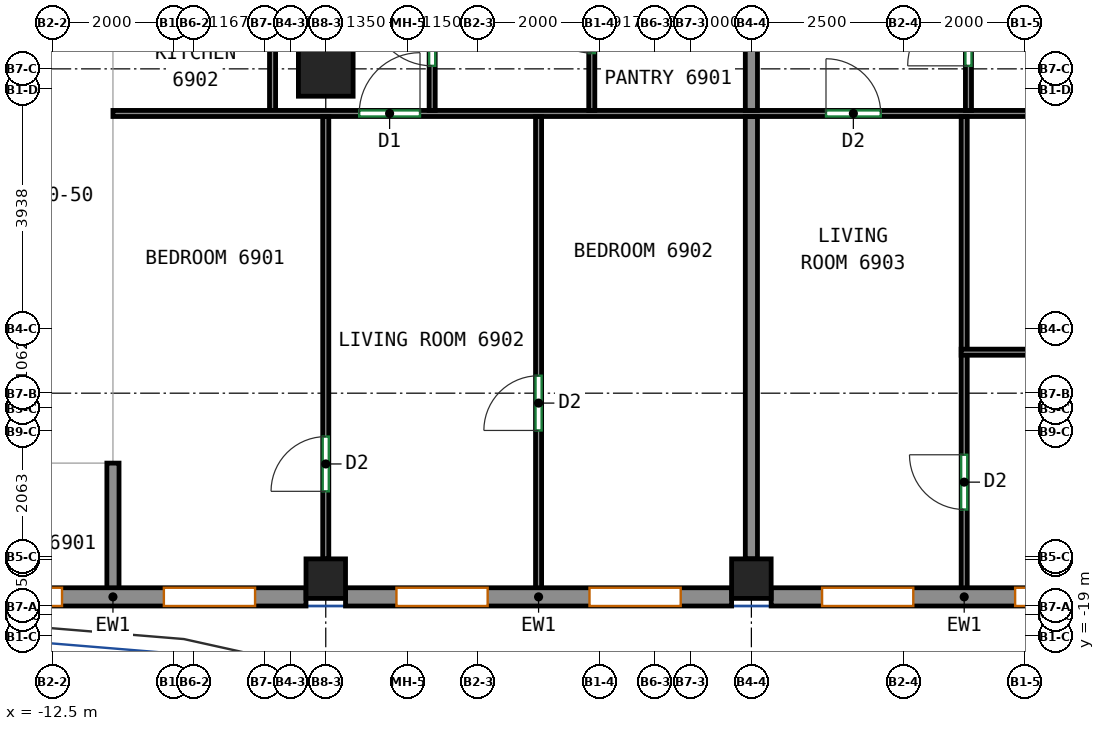
"""IFC4 building model, lengths in metres.
Left out: names, types, materials, properties, quantities, classifications, styles, units other than length and angle.
Written with IfcOpenShell. Run it as: python <this file> out.ifc"""

import sys

from ifc_helpers import new_model, si_unit, direction, frame, frame_2d, origin, origin_2d, place, context, subcontext, project, spatial, rectangle, extrude, source, transform, mapped, element, fill, save


model = new_model("IFC4")
c1 = context("Model", 3, precision=1e-05, world=origin(), true_north=direction((0.0, 1.0)))
c2 = subcontext(c1, "Body", "Model", "MODEL_VIEW")
j1 = project(units=[si_unit("LENGTHUNIT", "METRE"), si_unit("PLANEANGLEUNIT", "RADIAN")], contexts=[c1])
p1 = place(None, origin())
s1 = spatial("IfcSite", under=j1, at=p1, CompositionType="ELEMENT")
p2 = place(p1, origin())
s2 = spatial("IfcBuilding", under=s1, at=p2, CompositionType="ELEMENT")
p3 = place(p2, frame((0.0, 0.0, 280.6)))
s3 = spatial("IfcBuildingStorey", under=s2, at=p3, CompositionType="ELEMENT", Elevation=280.6)
m1 = source(origin(), c2, "Body", "SweptSolid", [
    extrude(rectangle(XDim=0.65, YDim=0.65, at=origin_2d()), origin(), (0.0, 0.0, 1.0), 3.12),
])
p4 = place(p3, frame((-8.0, -18.05, 0.0), z_axis=(0.0, 0.0, 1.0), x_axis=(1.0, 0.0, 0.0)))
e1 = element("IfcColumn", 1, at=p4, inside=s3, PredefinedType="COLUMN", context=c2, shape_type="MappedRepresentation", body=[
    mapped(m1, transform((0.0, 0.0, 0.0))),
])
m2 = source(origin(), c2, "Body", "SweptSolid", [
    extrude(rectangle(XDim=0.9, YDim=0.9, at=origin_2d()), origin(), (0.0, 0.0, 1.0), 3.12),
])
p5 = place(p3, frame((-8.0, -9.667, 0.0), z_axis=(0.0, 0.0, 1.0), x_axis=(1.0, 0.0, 0.0)))
e2 = element("IfcColumn", 2, at=p5, inside=s3, PredefinedType="COLUMN", context=c2, shape_type="MappedRepresentation", body=[
    mapped(m2, transform((0.0, 0.0, 0.0))),
])
p6 = place(p3, frame((-1.0, -18.05, 0.0), z_axis=(0.0, 0.0, 1.0), x_axis=(1.0, 0.0, 0.0)))
e3 = element("IfcColumn", 3, at=p6, inside=s3, PredefinedType="COLUMN", context=c2, shape_type="MappedRepresentation", body=[
    mapped(m1, transform((0.0, 0.0, 0.0))),
])
m3 = source(origin(), c2, "Body", "SweptSolid", [
    extrude(rectangle(XDim=6.35, YDim=0.3, at=frame_2d((3.175, 0.0))), origin(), (0.0, 0.0, 1.0), 3.12),
])
p7 = place(p3, frame((-14.675, -18.35, 0.0), z_axis=(0.0, 0.0, 1.0), x_axis=(1.0, 0.0, 0.0)))
e4 = element("IfcWall", 4, at=p7, inside=s3, PredefinedType="SOLIDWALL", context=c2, shape_type="MappedRepresentation", body=[
    mapped(m3, transform((0.0, 0.0, 0.0))),
])
p8 = place(p7, frame((0.837, 0.0, 0.8)))
e5 = element("IfcOpeningElement", 5, at=p8, cuts=e4, PredefinedType="OPENING", context=c2, shape_type="SweptSolid", body=[
    extrude(rectangle(XDim=1.5, YDim=2.05, at=frame_2d((0.75, 1.025))), frame((0.0, 0.16, 0.0), z_axis=(0.0, -1.0, 0.0), x_axis=(1.0, 0.0, 0.0)), (0.0, 0.0, 1.0), 0.32),
])
p9 = place(p7, frame((4.012, 0.0, 0.8)))
e6 = element("IfcOpeningElement", 6, at=p9, cuts=e4, PredefinedType="OPENING", context=c2, shape_type="SweptSolid", body=[
    extrude(rectangle(XDim=1.5, YDim=2.05, at=frame_2d((0.75, 1.025))), frame((0.0, 0.16, 0.0), z_axis=(0.0, -1.0, 0.0), x_axis=(1.0, 0.0, 0.0)), (0.0, 0.0, 1.0), 0.32),
])
p10 = place(p3, frame((-7.675, -18.35, 0.0), z_axis=(0.0, 0.0, 1.0), x_axis=(1.0, 0.0, 0.0)))
e7 = element("IfcWall", 7, at=p10, inside=s3, PredefinedType="SOLIDWALL", context=c2, shape_type="MappedRepresentation", body=[
    mapped(m3, transform((0.0, 0.0, 0.0))),
])
p11 = place(p10, frame((0.837, 0.0, 0.8)))
e8 = element("IfcOpeningElement", 8, at=p11, cuts=e7, PredefinedType="OPENING", context=c2, shape_type="SweptSolid", body=[
    extrude(rectangle(XDim=1.5, YDim=2.05, at=frame_2d((0.75, 1.025))), frame((0.0, 0.16, 0.0), z_axis=(0.0, -1.0, 0.0), x_axis=(1.0, 0.0, 0.0)), (0.0, 0.0, 1.0), 0.32),
])
p12 = place(p10, frame((4.012, 0.0, 0.8)))
e9 = element("IfcOpeningElement", 9, at=p12, cuts=e7, PredefinedType="OPENING", context=c2, shape_type="SweptSolid", body=[
    extrude(rectangle(XDim=1.5, YDim=2.05, at=frame_2d((0.75, 1.025))), frame((0.0, 0.16, 0.0), z_axis=(0.0, -1.0, 0.0), x_axis=(1.0, 0.0, 0.0)), (0.0, 0.0, 1.0), 0.32),
])
p13 = place(p3, frame((-0.675, -18.35, 0.0), z_axis=(0.0, 0.0, 1.0), x_axis=(1.0, 0.0, 0.0)))
e10 = element("IfcWall", 10, at=p13, inside=s3, PredefinedType="SOLIDWALL", context=c2, shape_type="MappedRepresentation", body=[
    mapped(m3, transform((0.0, 0.0, 0.0))),
])
p14 = place(p13, frame((0.837, 0.0, 0.8)))
e11 = element("IfcOpeningElement", 11, at=p14, cuts=e10, PredefinedType="OPENING", context=c2, shape_type="SweptSolid", body=[
    extrude(rectangle(XDim=1.5, YDim=2.05, at=frame_2d((0.75, 1.025))), frame((0.0, 0.16, 0.0), z_axis=(0.0, -1.0, 0.0), x_axis=(1.0, 0.0, 0.0)), (0.0, 0.0, 1.0), 0.32),
])
p15 = place(p13, frame((4.012, 0.0, 0.8)))
e12 = element("IfcOpeningElement", 12, at=p15, cuts=e10, PredefinedType="OPENING", context=c2, shape_type="SweptSolid", body=[
    extrude(rectangle(XDim=1.5, YDim=2.05, at=frame_2d((0.75, 1.025))), frame((0.0, 0.16, 0.0), z_axis=(0.0, -1.0, 0.0), x_axis=(1.0, 0.0, 0.0)), (0.0, 0.0, 1.0), 0.32),
])
p16 = place(p3, frame((-11.5, -18.25, 0.0), z_axis=(0.0, 0.0, 1.0), x_axis=(0.0, 1.0, 0.0)))
e13 = element("IfcWall", 13, at=p16, inside=s3, PredefinedType="PARTITIONING", context=c2, shape_type="SweptSolid", body=[
    extrude(rectangle(XDim=2.1, YDim=0.2, at=frame_2d((1.05, 0.0))), origin(), (0.0, 0.0, 1.0), 3.12),
])
p17 = place(p3, frame((-8.875, -10.35, 0.0), z_axis=(0.0, 0.0, 1.0), x_axis=(0.0, 1.0, 0.0)))
e14 = element("IfcWall", 14, at=p17, inside=s3, PredefinedType="PARTITIONING", context=c2, shape_type="SweptSolid", body=[
    extrude(rectangle(XDim=2.573, YDim=0.1, at=frame_2d((1.287, 0.0))), origin(), (0.0, 0.0, 1.0), 3.12),
])
p18 = place(p17, frame((1.266, 0.0, 0.0)))
e15 = element("IfcOpeningElement", 15, at=p18, cuts=e14, PredefinedType="OPENING", context=c2, shape_type="SweptSolid", body=[
    extrude(rectangle(XDim=1.0, YDim=2.1, at=frame_2d((0.5, 1.05))), frame((0.0, 0.06, 0.0), z_axis=(0.0, -1.0, 0.0), x_axis=(1.0, 0.0, 0.0)), (0.0, 0.0, 1.0), 0.12),
])
p19 = place(p3, frame((-11.5, -10.4, 0.0), z_axis=(0.0, 0.0, 1.0), x_axis=(1.0, 0.0, 0.0)))
e16 = element("IfcWall", 16, at=p19, inside=s3, PredefinedType="PARTITIONING", context=c2, shape_type="SweptSolid", body=[
    extrude(rectangle(XDim=21.1, YDim=0.1, at=frame_2d((10.55, 0.0))), origin(), (0.0, 0.0, 1.0), 3.12),
])
p20 = place(p19, frame((4.05, 0.0, 0.0)))
e17 = element("IfcOpeningElement", 17, at=p20, cuts=e16, PredefinedType="OPENING", context=c2, shape_type="SweptSolid", body=[
    extrude(rectangle(XDim=1.0, YDim=2.1, at=frame_2d((0.5, 1.05))), frame((0.0, 0.06, 0.0), z_axis=(0.0, -1.0, 0.0), x_axis=(1.0, 0.0, 0.0)), (0.0, 0.0, 1.0), 0.12),
])
p21 = place(p19, frame((11.727, 0.0, 0.0)))
e18 = element("IfcOpeningElement", 18, at=p21, cuts=e16, PredefinedType="OPENING", context=c2, shape_type="SweptSolid", body=[
    extrude(rectangle(XDim=0.9, YDim=2.1, at=frame_2d((0.45, 1.05))), frame((0.0, 0.06, 0.0), z_axis=(0.0, -1.0, 0.0), x_axis=(1.0, 0.0, 0.0)), (0.0, 0.0, 1.0), 0.12),
])
p22 = place(p19, frame((15.225, 0.0, 0.0)))
e19 = element("IfcOpeningElement", 19, at=p22, cuts=e16, PredefinedType="OPENING", context=c2, shape_type="SweptSolid", body=[
    extrude(rectangle(XDim=1.0, YDim=2.1, at=frame_2d((0.5, 1.05))), frame((0.0, 0.06, 0.0), z_axis=(0.0, -1.0, 0.0), x_axis=(1.0, 0.0, 0.0)), (0.0, 0.0, 1.0), 0.12),
])
p23 = place(p3, frame((-6.25, -10.35, 0.0), z_axis=(0.0, 0.0, 1.0), x_axis=(0.0, 1.0, 0.0)))
e20 = element("IfcWall", 20, at=p23, inside=s3, PredefinedType="PARTITIONING", context=c2, shape_type="SweptSolid", body=[
    extrude(rectangle(XDim=2.573, YDim=0.1, at=frame_2d((1.287, 0.0))), origin(), (0.0, 0.0, 1.0), 3.12),
])
p24 = place(p23, frame((0.733, 0.0, 0.0)))
e21 = element("IfcOpeningElement", 21, at=p24, cuts=e20, PredefinedType="OPENING", context=c2, shape_type="SweptSolid", body=[
    extrude(rectangle(XDim=1.0, YDim=2.1, at=frame_2d((0.5, 1.05))), frame((0.0, 0.06, 0.0), z_axis=(0.0, -1.0, 0.0), x_axis=(1.0, 0.0, 0.0)), (0.0, 0.0, 1.0), 0.12),
])
p25 = place(p3, frame((-3.625, -10.35, 0.0), z_axis=(0.0, 0.0, 1.0), x_axis=(0.0, 1.0, 0.0)))
e22 = element("IfcWall", 22, at=p25, inside=s3, PredefinedType="PARTITIONING", context=c2, shape_type="SweptSolid", body=[
    extrude(rectangle(XDim=2.573, YDim=0.1, at=frame_2d((1.287, 0.0))), origin(), (0.0, 0.0, 1.0), 3.12),
])
p26 = place(p25, frame((0.943, 0.0, 0.0)))
e23 = element("IfcOpeningElement", 23, at=p26, cuts=e22, PredefinedType="OPENING", context=c2, shape_type="SweptSolid", body=[
    extrude(rectangle(XDim=0.9, YDim=2.1, at=frame_2d((0.45, 1.05))), frame((0.0, 0.06, 0.0), z_axis=(0.0, -1.0, 0.0), x_axis=(1.0, 0.0, 0.0)), (0.0, 0.0, 1.0), 0.12),
])
p27 = place(p3, frame((-1.0, -10.35, 0.0), z_axis=(0.0, 0.0, 1.0), x_axis=(0.0, 1.0, 0.0)))
e24 = element("IfcWall", 24, at=p27, inside=s3, PredefinedType="PARTITIONING", context=c2, shape_type="SweptSolid", body=[
    extrude(rectangle(XDim=2.573, YDim=0.2, at=frame_2d((1.287, 0.0))), origin(), (0.0, 0.0, 1.0), 3.12),
])
p28 = place(p3, frame((-8.0, -17.725, 0.0), z_axis=(0.0, 0.0, 1.0), x_axis=(0.0, 1.0, 0.0)))
e25 = element("IfcWall", 25, at=p28, inside=s3, PredefinedType="PARTITIONING", context=c2, shape_type="SweptSolid", body=[
    extrude(rectangle(XDim=7.273, YDim=0.1, at=frame_2d((3.637, 0.0))), origin(), (0.0, 0.0, 1.0), 3.12),
])
p29 = place(p28, frame((1.111, 0.0, 0.0)))
e26 = element("IfcOpeningElement", 26, at=p29, cuts=e25, PredefinedType="OPENING", context=c2, shape_type="SweptSolid", body=[
    extrude(rectangle(XDim=0.9, YDim=2.1, at=frame_2d((0.45, 1.05))), frame((0.0, 0.06, 0.0), z_axis=(0.0, -1.0, 0.0), x_axis=(1.0, 0.0, 0.0)), (0.0, 0.0, 1.0), 0.12),
])
p30 = place(p3, frame((-4.5, -18.25, 0.0), z_axis=(0.0, 0.0, 1.0), x_axis=(0.0, 1.0, 0.0)))
e27 = element("IfcWall", 27, at=p30, inside=s3, PredefinedType="PARTITIONING", context=c2, shape_type="SweptSolid", body=[
    extrude(rectangle(XDim=7.798, YDim=0.1, at=frame_2d((3.899, 0.0))), origin(), (0.0, 0.0, 1.0), 3.12),
])
p31 = place(p30, frame((2.637, 0.0, 0.0)))
e28 = element("IfcOpeningElement", 28, at=p31, cuts=e27, PredefinedType="OPENING", context=c2, shape_type="SweptSolid", body=[
    extrude(rectangle(XDim=0.9, YDim=2.1, at=frame_2d((0.45, 1.05))), frame((0.0, 0.06, 0.0), z_axis=(0.0, -1.0, 0.0), x_axis=(1.0, 0.0, 0.0)), (0.0, 0.0, 1.0), 0.12),
])
p32 = place(p3, frame((-1.0, -17.725, 0.0), z_axis=(0.0, 0.0, 1.0), x_axis=(0.0, 1.0, 0.0)))
e29 = element("IfcWall", 29, at=p32, inside=s3, PredefinedType="PARTITIONING", context=c2, shape_type="SweptSolid", body=[
    extrude(rectangle(XDim=7.273, YDim=0.2, at=frame_2d((3.637, 0.0))), origin(), (0.0, 0.0, 1.0), 3.12),
])
p33 = place(p3, frame((2.57, -10.35, 0.0), z_axis=(0.0, 0.0, 1.0), x_axis=(0.0, 1.0, 0.0)))
e30 = element("IfcWall", 30, at=p33, inside=s3, PredefinedType="PARTITIONING", context=c2, shape_type="SweptSolid", body=[
    extrude(rectangle(XDim=2.573, YDim=0.1, at=frame_2d((1.287, 0.0))), origin(), (0.0, 0.0, 1.0), 3.12),
])
p34 = place(p33, frame((0.733, 0.0, 0.0)))
e31 = element("IfcOpeningElement", 31, at=p34, cuts=e30, PredefinedType="OPENING", context=c2, shape_type="SweptSolid", body=[
    extrude(rectangle(XDim=1.0, YDim=2.1, at=frame_2d((0.5, 1.05))), frame((0.0, 0.06, 0.0), z_axis=(0.0, -1.0, 0.0), x_axis=(1.0, 0.0, 0.0)), (0.0, 0.0, 1.0), 0.12),
])
p35 = place(p3, frame((2.5, -18.25, 0.0), z_axis=(0.0, 0.0, 1.0), x_axis=(0.0, 1.0, 0.0)))
e32 = element("IfcWall", 32, at=p35, inside=s3, PredefinedType="PARTITIONING", context=c2, shape_type="SweptSolid", body=[
    extrude(rectangle(XDim=3.884, YDim=0.1, at=frame_2d((1.942, 0.0))), origin(), (0.0, 0.0, 1.0), 3.12),
])
p36 = place(p35, frame((1.337, 0.0, 0.0)))
e33 = element("IfcOpeningElement", 33, at=p36, cuts=e32, PredefinedType="OPENING", context=c2, shape_type="SweptSolid", body=[
    extrude(rectangle(XDim=0.9, YDim=2.1, at=frame_2d((0.45, 1.05))), frame((0.0, 0.06, 0.0), z_axis=(0.0, -1.0, 0.0), x_axis=(1.0, 0.0, 0.0)), (0.0, 0.0, 1.0), 0.12),
])
p37 = place(p3, frame((2.5, -14.286, 0.0), z_axis=(0.0, 0.0, 1.0), x_axis=(0.0, 1.0, 0.0)))
e34 = element("IfcWall", 34, at=p37, inside=s3, PredefinedType="PARTITIONING", context=c2, shape_type="SweptSolid", body=[
    extrude(rectangle(XDim=3.834, YDim=0.1, at=frame_2d((1.917, 0.0))), origin(), (0.0, 0.0, 1.0), 3.12),
])
p38 = place(p3, frame((9.6, -14.326, 0.0), z_axis=(0.0, 0.0, 1.0), x_axis=(-1.0, 0.0, 0.0)))
e35 = element("IfcWall", 35, at=p38, inside=s3, PredefinedType="PARTITIONING", context=c2, shape_type="SweptSolid", body=[
    extrude(rectangle(XDim=7.15, YDim=0.1, at=frame_2d((3.575, 0.0))), origin(), (0.0, 0.0, 1.0), 3.12),
])
p39 = place(p8, origin())
e36 = element("IfcWindow", 36, at=p39, inside=s3, PartitioningType="SINGLE_PANEL", PredefinedType="WINDOW", context=c2, shape_type="SweptSolid", body=[
    extrude(rectangle(XDim=1.5, YDim=2.05, at=frame_2d((0.75, 1.025))), frame((0.0, 0.03, 0.0), z_axis=(0.0, -1.0, 0.0), x_axis=(1.0, 0.0, 0.0)), (0.0, 0.0, 1.0), 0.06),
])
fill(e5, e36)
p40 = place(p9, origin())
e37 = element("IfcWindow", 37, at=p40, inside=s3, PartitioningType="SINGLE_PANEL", PredefinedType="WINDOW", context=c2, shape_type="SweptSolid", body=[
    extrude(rectangle(XDim=1.5, YDim=2.05, at=frame_2d((0.75, 1.025))), frame((0.0, 0.03, 0.0), z_axis=(0.0, -1.0, 0.0), x_axis=(1.0, 0.0, 0.0)), (0.0, 0.0, 1.0), 0.06),
])
fill(e6, e37)
p41 = place(p11, origin())
e38 = element("IfcWindow", 38, at=p41, inside=s3, PartitioningType="SINGLE_PANEL", PredefinedType="WINDOW", context=c2, shape_type="SweptSolid", body=[
    extrude(rectangle(XDim=1.5, YDim=2.05, at=frame_2d((0.75, 1.025))), frame((0.0, 0.03, 0.0), z_axis=(0.0, -1.0, 0.0), x_axis=(1.0, 0.0, 0.0)), (0.0, 0.0, 1.0), 0.06),
])
fill(e8, e38)
p42 = place(p12, origin())
e39 = element("IfcWindow", 39, at=p42, inside=s3, PartitioningType="SINGLE_PANEL", PredefinedType="WINDOW", context=c2, shape_type="SweptSolid", body=[
    extrude(rectangle(XDim=1.5, YDim=2.05, at=frame_2d((0.75, 1.025))), frame((0.0, 0.03, 0.0), z_axis=(0.0, -1.0, 0.0), x_axis=(1.0, 0.0, 0.0)), (0.0, 0.0, 1.0), 0.06),
])
fill(e9, e39)
p43 = place(p14, origin())
e40 = element("IfcWindow", 40, at=p43, inside=s3, PartitioningType="SINGLE_PANEL", PredefinedType="WINDOW", context=c2, shape_type="SweptSolid", body=[
    extrude(rectangle(XDim=1.5, YDim=2.05, at=frame_2d((0.75, 1.025))), frame((0.0, 0.03, 0.0), z_axis=(0.0, -1.0, 0.0), x_axis=(1.0, 0.0, 0.0)), (0.0, 0.0, 1.0), 0.06),
])
fill(e11, e40)
p44 = place(p15, origin())
e41 = element("IfcWindow", 41, at=p44, inside=s3, PartitioningType="SINGLE_PANEL", PredefinedType="WINDOW", context=c2, shape_type="SweptSolid", body=[
    extrude(rectangle(XDim=1.5, YDim=2.05, at=frame_2d((0.75, 1.025))), frame((0.0, 0.03, 0.0), z_axis=(0.0, -1.0, 0.0), x_axis=(1.0, 0.0, 0.0)), (0.0, 0.0, 1.0), 0.06),
])
fill(e12, e41)
p45 = place(p36, origin())
e42 = element("IfcDoor", 42, at=p45, inside=s3, OperationType="SINGLE_SWING_RIGHT", PredefinedType="DOOR", context=c2, shape_type="SweptSolid", body=[
    extrude(rectangle(XDim=0.9, YDim=2.1, at=frame_2d((0.45, 1.05))), frame((0.0, 0.025, 0.0), z_axis=(0.0, -1.0, 0.0), x_axis=(1.0, 0.0, 0.0)), (0.0, 0.0, 1.0), 0.05),
])
fill(e33, e42)
p46 = place(p29, origin())
e43 = element("IfcDoor", 43, at=p46, inside=s3, OperationType="SINGLE_SWING_LEFT", PredefinedType="DOOR", context=c2, shape_type="SweptSolid", body=[
    extrude(rectangle(XDim=0.9, YDim=2.1, at=frame_2d((0.45, 1.05))), frame((0.0, 0.025, 0.0), z_axis=(0.0, -1.0, 0.0), x_axis=(1.0, 0.0, 0.0)), (0.0, 0.0, 1.0), 0.05),
])
fill(e26, e43)
p47 = place(p31, origin())
e44 = element("IfcDoor", 44, at=p47, inside=s3, OperationType="SINGLE_SWING_LEFT", PredefinedType="DOOR", context=c2, shape_type="SweptSolid", body=[
    extrude(rectangle(XDim=0.9, YDim=2.1, at=frame_2d((0.45, 1.05))), frame((0.0, 0.025, 0.0), z_axis=(0.0, -1.0, 0.0), x_axis=(1.0, 0.0, 0.0)), (0.0, 0.0, 1.0), 0.05),
])
fill(e28, e44)
p48 = place(p20, origin())
e45 = element("IfcDoor", 45, at=p48, inside=s3, OperationType="SINGLE_SWING_RIGHT", PredefinedType="DOOR", context=c2, shape_type="SweptSolid", body=[
    extrude(rectangle(XDim=1.0, YDim=2.1, at=frame_2d((0.5, 1.05))), frame((0.0, 0.025, 0.0), z_axis=(0.0, -1.0, 0.0), x_axis=(1.0, 0.0, 0.0)), (0.0, 0.0, 1.0), 0.05),
])
fill(e17, e45)
p49 = place(p21, origin())
e46 = element("IfcDoor", 46, at=p49, inside=s3, OperationType="SINGLE_SWING_LEFT", PredefinedType="DOOR", context=c2, shape_type="SweptSolid", body=[
    extrude(rectangle(XDim=0.9, YDim=2.1, at=frame_2d((0.45, 1.05))), frame((0.0, 0.025, 0.0), z_axis=(0.0, -1.0, 0.0), x_axis=(1.0, 0.0, 0.0)), (0.0, 0.0, 1.0), 0.05),
])
fill(e18, e46)
p50 = place(p24, origin())
e47 = element("IfcDoor", 47, at=p50, inside=s3, OperationType="SINGLE_SWING_RIGHT", PredefinedType="DOOR", context=c2, shape_type="SweptSolid", body=[
    extrude(rectangle(XDim=1.0, YDim=2.1, at=frame_2d((0.5, 1.05))), frame((0.0, 0.025, 0.0), z_axis=(0.0, -1.0, 0.0), x_axis=(1.0, 0.0, 0.0)), (0.0, 0.0, 1.0), 0.05),
])
fill(e21, e47)
p51 = place(p34, origin())
e48 = element("IfcDoor", 48, at=p51, inside=s3, OperationType="SINGLE_SWING_LEFT", PredefinedType="DOOR", context=c2, shape_type="SweptSolid", body=[
    extrude(rectangle(XDim=1.0, YDim=2.1, at=frame_2d((0.5, 1.05))), frame((0.0, 0.025, 0.0), z_axis=(0.0, -1.0, 0.0), x_axis=(1.0, 0.0, 0.0)), (0.0, 0.0, 1.0), 0.05),
])
fill(e31, e48)
p52 = place(p26, origin())
e49 = element("IfcDoor", 49, at=p52, inside=s3, OperationType="SINGLE_SWING_RIGHT", PredefinedType="DOOR", context=c2, shape_type="SweptSolid", body=[
    extrude(rectangle(XDim=0.9, YDim=2.1, at=frame_2d((0.45, 1.05))), frame((0.0, 0.025, 0.0), z_axis=(0.0, -1.0, 0.0), x_axis=(1.0, 0.0, 0.0)), (0.0, 0.0, 1.0), 0.05),
])
fill(e23, e49)
save(model, sys.argv[1])
